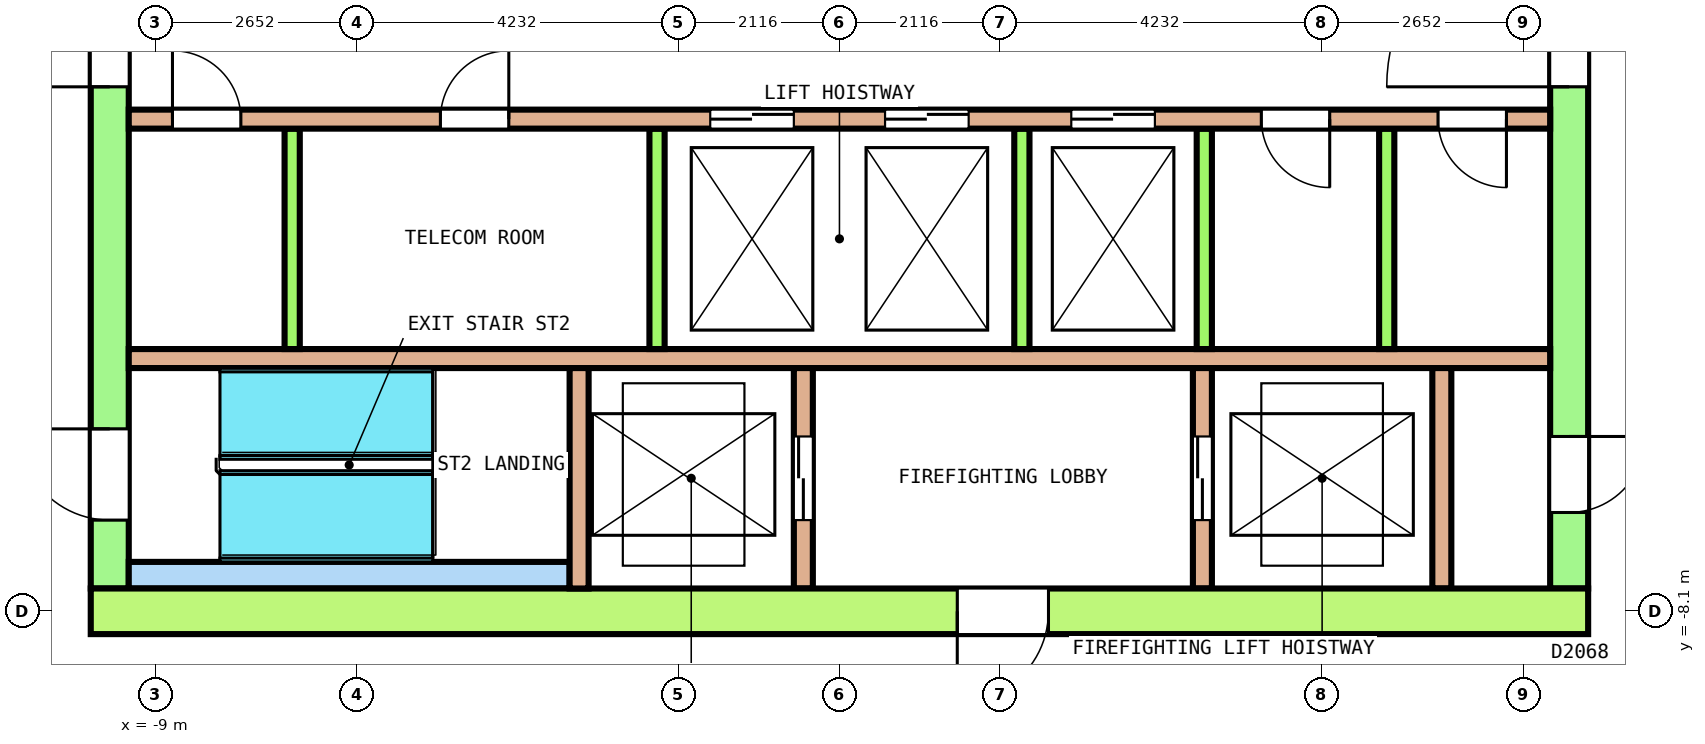
"""IFC4 building model, lengths in metres.
Left out: names, types, materials, properties, quantities, classifications, styles, units other than length and angle.
Written with IfcOpenShell. Run it as: python <this file> out.ifc"""

import sys

from ifc_helpers import new_model, si_unit, direction, frame, frame_2d, origin, place, context, subcontext, project, spatial, rectangle, extrude, element, fill, save


model = new_model("IFC4")
c1 = context("Model", 3, precision=1e-05, world=origin(), true_north=direction((0.0, 1.0)))
c2 = subcontext(c1, "Body", "Model", "MODEL_VIEW")
j1 = project(units=[si_unit("LENGTHUNIT", "METRE"), si_unit("PLANEANGLEUNIT", "RADIAN")], contexts=[c1])
p1 = place(None, origin())
s1 = spatial("IfcSite", under=j1, at=p1, CompositionType="ELEMENT")
p2 = place(p1, origin())
s2 = spatial("IfcBuilding", under=s1, at=p2, CompositionType="ELEMENT")
p3 = place(p2, frame((0.0, 0.0, 249.4)))
s3 = spatial("IfcBuildingStorey", under=s2, at=p3, CompositionType="ELEMENT", Elevation=249.4)
p4 = place(p3, frame((-9.85, -8.1, 0.0), z_axis=(0.0, 0.0, 1.0), x_axis=(1.0, 0.0, 0.0)))
e1 = element("IfcWall", 1, at=p4, inside=s3, PredefinedType="SHEAR", context=c2, shape_type="SweptSolid", body=[
    extrude(rectangle(XDim=19.7, YDim=0.6, at=frame_2d((9.85, 0.0))), origin(), (0.0, 0.0, 1.0), 3.7),
])
p5 = place(p4, frame((11.4, 0.0, 0.0)))
e2 = element("IfcOpeningElement", 2, at=p5, cuts=e1, PredefinedType="OPENING", context=c2, shape_type="SweptSolid", body=[
    extrude(rectangle(XDim=1.2, YDim=2.1, at=frame_2d((0.6, 1.05))), frame((0.0, 0.31, 0.0), z_axis=(0.0, -1.0, 0.0), x_axis=(1.0, 0.0, 0.0)), (0.0, 0.0, 1.0), 0.62),
])
p6 = place(p3, frame((-9.6, -7.8, 0.0), z_axis=(0.0, 0.0, 1.0), x_axis=(0.0, 1.0, 0.0)))
e3 = element("IfcWall", 3, at=p6, inside=s3, PredefinedType="SHEAR", context=c2, shape_type="SweptSolid", body=[
    extrude(rectangle(XDim=15.6, YDim=0.5, at=frame_2d((7.8, 0.0))), origin(), (0.0, 0.0, 1.0), 3.7),
])
p7 = place(p6, frame((6.6, 0.0, 0.0)))
e4 = element("IfcOpeningElement", 4, at=p7, cuts=e3, PredefinedType="OPENING", context=c2, shape_type="SweptSolid", body=[
    extrude(rectangle(XDim=2.4, YDim=2.1, at=frame_2d((1.2, 1.05))), frame((0.0, 0.26, 0.0), z_axis=(0.0, -1.0, 0.0), x_axis=(1.0, 0.0, 0.0)), (0.0, 0.0, 1.0), 0.52),
])
p8 = place(p6, frame((13.5, 0.0, 0.0)))
e5 = element("IfcOpeningElement", 5, at=p8, cuts=e3, PredefinedType="OPENING", context=c2, shape_type="SweptSolid", body=[
    extrude(rectangle(XDim=1.2, YDim=2.1, at=frame_2d((0.6, 1.05))), frame((0.0, 0.26, 0.0), z_axis=(0.0, -1.0, 0.0), x_axis=(1.0, 0.0, 0.0)), (0.0, 0.0, 1.0), 0.52),
])
p9 = place(p6, frame((0.9, 0.0, 0.0)))
e6 = element("IfcOpeningElement", 6, at=p9, cuts=e3, PredefinedType="OPENING", context=c2, shape_type="SweptSolid", body=[
    extrude(rectangle(XDim=1.2, YDim=2.1, at=frame_2d((0.6, 1.05))), frame((0.0, 0.26, 0.0), z_axis=(0.0, -1.0, 0.0), x_axis=(1.0, 0.0, 0.0)), (0.0, 0.0, 1.0), 0.52),
])
p10 = place(p3, frame((9.6, -7.8, 0.0), z_axis=(0.0, 0.0, 1.0), x_axis=(0.0, 1.0, 0.0)))
e7 = element("IfcWall", 7, at=p10, inside=s3, PredefinedType="SHEAR", context=c2, shape_type="SweptSolid", body=[
    extrude(rectangle(XDim=15.6, YDim=0.5, at=frame_2d((7.8, 0.0))), origin(), (0.0, 0.0, 1.0), 3.7),
])
p11 = place(p10, frame((6.6, 0.0, 0.0)))
e8 = element("IfcOpeningElement", 8, at=p11, cuts=e7, PredefinedType="OPENING", context=c2, shape_type="SweptSolid", body=[
    extrude(rectangle(XDim=2.4, YDim=2.1, at=frame_2d((1.2, 1.05))), frame((0.0, 0.26, 0.0), z_axis=(0.0, -1.0, 0.0), x_axis=(1.0, 0.0, 0.0)), (0.0, 0.0, 1.0), 0.52),
])
p12 = place(p10, frame((13.5, 0.0, 0.0)))
e9 = element("IfcOpeningElement", 9, at=p12, cuts=e7, PredefinedType="OPENING", context=c2, shape_type="SweptSolid", body=[
    extrude(rectangle(XDim=1.2, YDim=2.1, at=frame_2d((0.6, 1.05))), frame((0.0, 0.26, 0.0), z_axis=(0.0, -1.0, 0.0), x_axis=(1.0, 0.0, 0.0)), (0.0, 0.0, 1.0), 0.52),
])
p13 = place(p10, frame((1.0, 0.0, 0.0)))
e10 = element("IfcOpeningElement", 10, at=p13, cuts=e7, PredefinedType="OPENING", context=c2, shape_type="SweptSolid", body=[
    extrude(rectangle(XDim=1.0, YDim=2.1, at=frame_2d((0.5, 1.05))), frame((0.0, 0.26, 0.0), z_axis=(0.0, -1.0, 0.0), x_axis=(1.0, 0.0, 0.0)), (0.0, 0.0, 1.0), 0.52),
])
p14 = place(p3, frame((-9.35, -1.625, 0.0), z_axis=(0.0, 0.0, 1.0), x_axis=(1.0, 0.0, 0.0)))
e11 = element("IfcWall", 11, at=p14, inside=s3, PredefinedType="SOLIDWALL", context=c2, shape_type="SweptSolid", body=[
    extrude(rectangle(XDim=18.7, YDim=0.25, at=frame_2d((9.35, 0.0))), origin(), (0.0, 0.0, 1.0), 3.7),
])
p15 = place(p14, frame((7.65, 0.0, 0.0)))
e12 = element("IfcOpeningElement", 12, at=p15, cuts=e11, PredefinedType="OPENING", context=c2, shape_type="SweptSolid", body=[
    extrude(rectangle(XDim=1.1, YDim=2.1, at=frame_2d((0.55, 1.05))), frame((0.0, 0.135, 0.0), z_axis=(0.0, -1.0, 0.0), x_axis=(1.0, 0.0, 0.0)), (0.0, 0.0, 1.0), 0.27),
])
p16 = place(p14, frame((9.95, 0.0, 0.0)))
e13 = element("IfcOpeningElement", 13, at=p16, cuts=e11, PredefinedType="OPENING", context=c2, shape_type="SweptSolid", body=[
    extrude(rectangle(XDim=1.1, YDim=2.1, at=frame_2d((0.55, 1.05))), frame((0.0, 0.135, 0.0), z_axis=(0.0, -1.0, 0.0), x_axis=(1.0, 0.0, 0.0)), (0.0, 0.0, 1.0), 0.27),
])
p17 = place(p14, frame((12.4, 0.0, 0.0)))
e14 = element("IfcOpeningElement", 14, at=p17, cuts=e11, PredefinedType="OPENING", context=c2, shape_type="SweptSolid", body=[
    extrude(rectangle(XDim=1.1, YDim=2.1, at=frame_2d((0.55, 1.05))), frame((0.0, 0.135, 0.0), z_axis=(0.0, -1.0, 0.0), x_axis=(1.0, 0.0, 0.0)), (0.0, 0.0, 1.0), 0.27),
])
p18 = place(p14, frame((0.575, 0.0, 0.0)))
e15 = element("IfcOpeningElement", 15, at=p18, cuts=e11, PredefinedType="OPENING", context=c2, shape_type="SweptSolid", body=[
    extrude(rectangle(XDim=0.9, YDim=2.1, at=frame_2d((0.45, 1.05))), frame((0.0, 0.135, 0.0), z_axis=(0.0, -1.0, 0.0), x_axis=(1.0, 0.0, 0.0)), (0.0, 0.0, 1.0), 0.27),
])
p19 = place(p14, frame((4.1, 0.0, 0.0)))
e16 = element("IfcOpeningElement", 16, at=p19, cuts=e11, PredefinedType="OPENING", context=c2, shape_type="SweptSolid", body=[
    extrude(rectangle(XDim=0.9, YDim=2.1, at=frame_2d((0.45, 1.05))), frame((0.0, 0.135, 0.0), z_axis=(0.0, -1.0, 0.0), x_axis=(1.0, 0.0, 0.0)), (0.0, 0.0, 1.0), 0.27),
])
p20 = place(p14, frame((14.9, 0.0, 0.0)))
e17 = element("IfcOpeningElement", 17, at=p20, cuts=e11, PredefinedType="OPENING", context=c2, shape_type="SweptSolid", body=[
    extrude(rectangle(XDim=0.9, YDim=2.1, at=frame_2d((0.45, 1.05))), frame((0.0, 0.135, 0.0), z_axis=(0.0, -1.0, 0.0), x_axis=(1.0, 0.0, 0.0)), (0.0, 0.0, 1.0), 0.27),
])
p21 = place(p14, frame((17.225, 0.0, 0.0)))
e18 = element("IfcOpeningElement", 18, at=p21, cuts=e11, PredefinedType="OPENING", context=c2, shape_type="SweptSolid", body=[
    extrude(rectangle(XDim=0.9, YDim=2.1, at=frame_2d((0.45, 1.05))), frame((0.0, 0.135, 0.0), z_axis=(0.0, -1.0, 0.0), x_axis=(1.0, 0.0, 0.0)), (0.0, 0.0, 1.0), 0.27),
])
p22 = place(p3, frame((-9.35, -4.775, 0.0), z_axis=(0.0, 0.0, 1.0), x_axis=(1.0, 0.0, 0.0)))
e19 = element("IfcWall", 19, at=p22, inside=s3, PredefinedType="SOLIDWALL", context=c2, shape_type="SweptSolid", body=[
    extrude(rectangle(XDim=18.7, YDim=0.25, at=frame_2d((9.35, 0.0))), origin(), (0.0, 0.0, 1.0), 3.7),
])
for number, where, z_axis, x_axis in (
    (20, (-7.2, -4.65, 0.0), (0.0, 0.0, 1.0), (0.0, 1.0, 0.0)),
    (21, (-2.4, -4.65, 0.0), (0.0, 0.0, 1.0), (0.0, 1.0, 0.0)),
    (22, (2.4, -4.65, 0.0), (0.0, 0.0, 1.0), (0.0, 1.0, 0.0)),
    (23, (4.8, -4.65, 0.0), (0.0, 0.0, 1.0), (0.0, 1.0, 0.0)),
    (24, (7.2, -4.65, 0.0), (0.0, 0.0, 1.0), (0.0, 1.0, 0.0)),
):
    element("IfcWall", number, at=place(p3, frame(where, z_axis=z_axis, x_axis=x_axis)), inside=s3, PredefinedType="SOLIDWALL", context=c2, shape_type="SweptSolid", body=[
        extrude(rectangle(XDim=2.9, YDim=0.2, at=frame_2d((1.45, 0.0))), origin(), (0.0, 0.0, 1.0), 3.7),
    ])
p23 = place(p3, frame((-9.35, -7.625, 0.0), z_axis=(0.0, 0.0, 1.0), x_axis=(1.0, 0.0, 0.0)))
e25 = element("IfcWall", 25, at=p23, inside=s3, PredefinedType="SOLIDWALL", context=c2, shape_type="SweptSolid", body=[
    extrude(rectangle(XDim=5.8, YDim=0.35, at=frame_2d((2.9, 0.0))), origin(), (0.0, 0.0, 1.0), 3.7),
])
p24 = place(p3, frame((-3.425, -7.8, 0.0), z_axis=(0.0, 0.0, 1.0), x_axis=(0.0, 1.0, 0.0)))
e26 = element("IfcWall", 26, at=p24, inside=s3, PredefinedType="SOLIDWALL", context=c2, shape_type="SweptSolid", body=[
    extrude(rectangle(XDim=2.9, YDim=0.25, at=frame_2d((1.45, 0.0))), origin(), (0.0, 0.0, 1.0), 3.7),
])
p25 = place(p3, frame((-0.475, -7.8, 0.0), z_axis=(0.0, 0.0, 1.0), x_axis=(0.0, 1.0, 0.0)))
e27 = element("IfcWall", 27, at=p25, inside=s3, PredefinedType="SOLIDWALL", context=c2, shape_type="SweptSolid", body=[
    extrude(rectangle(XDim=2.9, YDim=0.25, at=frame_2d((1.45, 0.0))), origin(), (0.0, 0.0, 1.0), 3.7),
])
p26 = place(p25, frame((0.9, 0.0, 0.0)))
e28 = element("IfcOpeningElement", 28, at=p26, cuts=e27, PredefinedType="OPENING", context=c2, shape_type="SweptSolid", body=[
    extrude(rectangle(XDim=1.1, YDim=2.1, at=frame_2d((0.55, 1.05))), frame((0.0, 0.135, 0.0), z_axis=(0.0, -1.0, 0.0), x_axis=(1.0, 0.0, 0.0)), (0.0, 0.0, 1.0), 0.27),
])
p27 = place(p3, frame((4.775, -7.8, 0.0), z_axis=(0.0, 0.0, 1.0), x_axis=(0.0, 1.0, 0.0)))
e29 = element("IfcWall", 29, at=p27, inside=s3, PredefinedType="SOLIDWALL", context=c2, shape_type="SweptSolid", body=[
    extrude(rectangle(XDim=2.9, YDim=0.25, at=frame_2d((1.45, 0.0))), origin(), (0.0, 0.0, 1.0), 3.7),
])
p28 = place(p27, frame((0.9, 0.0, 0.0)))
e30 = element("IfcOpeningElement", 30, at=p28, cuts=e29, PredefinedType="OPENING", context=c2, shape_type="SweptSolid", body=[
    extrude(rectangle(XDim=1.1, YDim=2.1, at=frame_2d((0.55, 1.05))), frame((0.0, 0.135, 0.0), z_axis=(0.0, -1.0, 0.0), x_axis=(1.0, 0.0, 0.0)), (0.0, 0.0, 1.0), 0.27),
])
p29 = place(p3, frame((7.925, -7.8, 0.0), z_axis=(0.0, 0.0, 1.0), x_axis=(0.0, 1.0, 0.0)))
e31 = element("IfcWall", 31, at=p29, inside=s3, PredefinedType="SOLIDWALL", context=c2, shape_type="SweptSolid", body=[
    extrude(rectangle(XDim=2.9, YDim=0.25, at=frame_2d((1.45, 0.0))), origin(), (0.0, 0.0, 1.0), 3.7),
])
p30 = place(p15, origin())
e32 = element("IfcDoor", 32, at=p30, inside=s3, OperationType="DOUBLE_DOOR_SLIDING", PredefinedType="DOOR", context=c2, shape_type="SweptSolid", body=[
    extrude(rectangle(XDim=1.1, YDim=2.1, at=frame_2d((0.55, 1.05))), frame((0.0, 0.075, 0.0), z_axis=(0.0, -1.0, 0.0), x_axis=(1.0, 0.0, 0.0)), (0.0, 0.0, 1.0), 0.15),
])
fill(e12, e32)
p31 = place(p16, origin())
e33 = element("IfcDoor", 33, at=p31, inside=s3, OperationType="DOUBLE_DOOR_SLIDING", PredefinedType="DOOR", context=c2, shape_type="SweptSolid", body=[
    extrude(rectangle(XDim=1.1, YDim=2.1, at=frame_2d((0.55, 1.05))), frame((0.0, 0.075, 0.0), z_axis=(0.0, -1.0, 0.0), x_axis=(1.0, 0.0, 0.0)), (0.0, 0.0, 1.0), 0.15),
])
fill(e13, e33)
p32 = place(p17, origin())
e34 = element("IfcDoor", 34, at=p32, inside=s3, OperationType="DOUBLE_DOOR_SLIDING", PredefinedType="DOOR", context=c2, shape_type="SweptSolid", body=[
    extrude(rectangle(XDim=1.1, YDim=2.1, at=frame_2d((0.55, 1.05))), frame((0.0, 0.075, 0.0), z_axis=(0.0, -1.0, 0.0), x_axis=(1.0, 0.0, 0.0)), (0.0, 0.0, 1.0), 0.15),
])
fill(e14, e34)
p33 = place(p26, origin())
e35 = element("IfcDoor", 35, at=p33, inside=s3, OperationType="DOUBLE_DOOR_SLIDING", PredefinedType="DOOR", context=c2, shape_type="SweptSolid", body=[
    extrude(rectangle(XDim=1.1, YDim=2.1, at=frame_2d((0.55, 1.05))), frame((0.0, 0.075, 0.0), z_axis=(0.0, -1.0, 0.0), x_axis=(1.0, 0.0, 0.0)), (0.0, 0.0, 1.0), 0.15),
])
fill(e28, e35)
p34 = place(p28, origin())
e36 = element("IfcDoor", 36, at=p34, inside=s3, OperationType="DOUBLE_DOOR_SLIDING", PredefinedType="DOOR", context=c2, shape_type="SweptSolid", body=[
    extrude(rectangle(XDim=1.1, YDim=2.1, at=frame_2d((0.55, 1.05))), frame((0.0, 0.075, 0.0), z_axis=(0.0, -1.0, 0.0), x_axis=(1.0, 0.0, 0.0)), (0.0, 0.0, 1.0), 0.15),
])
fill(e30, e36)
p35 = place(p7, origin())
e37 = element("IfcDoor", 37, at=p35, inside=s3, OperationType="DOUBLE_DOOR_SINGLE_SWING", PredefinedType="DOOR", context=c2, shape_type="SweptSolid", body=[
    extrude(rectangle(XDim=2.4, YDim=2.1, at=frame_2d((1.2, 1.05))), frame((0.0, 0.2, 0.0), z_axis=(0.0, -1.0, 0.0), x_axis=(1.0, 0.0, 0.0)), (0.0, 0.0, 1.0), 0.4),
])
fill(e4, e37)
p36 = place(p11, origin())
e38 = element("IfcDoor", 38, at=p36, inside=s3, OperationType="DOUBLE_DOOR_SINGLE_SWING", PredefinedType="DOOR", context=c2, shape_type="SweptSolid", body=[
    extrude(rectangle(XDim=2.4, YDim=2.1, at=frame_2d((1.2, 1.05))), frame((0.0, 0.2, 0.0), z_axis=(0.0, -1.0, 0.0), x_axis=(1.0, 0.0, 0.0)), (0.0, 0.0, 1.0), 0.4),
])
fill(e8, e38)
p37 = place(p9, origin())
e39 = element("IfcDoor", 39, at=p37, inside=s3, OperationType="SINGLE_SWING_LEFT", PredefinedType="DOOR", context=c2, shape_type="SweptSolid", body=[
    extrude(rectangle(XDim=1.2, YDim=2.1, at=frame_2d((0.6, 1.05))), frame((0.0, 0.2, 0.0), z_axis=(0.0, -1.0, 0.0), x_axis=(1.0, 0.0, 0.0)), (0.0, 0.0, 1.0), 0.4),
])
fill(e6, e39)
p38 = place(p5, origin())
e40 = element("IfcDoor", 40, at=p38, inside=s3, OperationType="SINGLE_SWING_LEFT", PredefinedType="DOOR", context=c2, shape_type="SweptSolid", body=[
    extrude(rectangle(XDim=1.2, YDim=2.1, at=frame_2d((0.6, 1.05))), frame((0.0, 0.25, 0.0), z_axis=(0.0, -1.0, 0.0), x_axis=(1.0, 0.0, 0.0)), (0.0, 0.0, 1.0), 0.5),
])
fill(e2, e40)
p39 = place(p13, origin())
e41 = element("IfcDoor", 41, at=p39, inside=s3, OperationType="SINGLE_SWING_LEFT", PredefinedType="DOOR", context=c2, shape_type="SweptSolid", body=[
    extrude(rectangle(XDim=1.0, YDim=2.1, at=frame_2d((0.5, 1.05))), frame((0.0, 0.2, 0.0), z_axis=(0.0, -1.0, 0.0), x_axis=(1.0, 0.0, 0.0)), (0.0, 0.0, 1.0), 0.4),
])
fill(e10, e41)
p40 = place(p18, origin())
e42 = element("IfcDoor", 42, at=p40, inside=s3, OperationType="SINGLE_SWING_RIGHT", PredefinedType="DOOR", context=c2, shape_type="SweptSolid", body=[
    extrude(rectangle(XDim=0.9, YDim=2.1, at=frame_2d((0.45, 1.05))), frame((0.0, 0.075, 0.0), z_axis=(0.0, -1.0, 0.0), x_axis=(1.0, 0.0, 0.0)), (0.0, 0.0, 1.0), 0.15),
])
fill(e15, e42)
p41 = place(p19, origin())
e43 = element("IfcDoor", 43, at=p41, inside=s3, OperationType="SINGLE_SWING_LEFT", PredefinedType="DOOR", context=c2, shape_type="SweptSolid", body=[
    extrude(rectangle(XDim=0.9, YDim=2.1, at=frame_2d((0.45, 1.05))), frame((0.0, 0.075, 0.0), z_axis=(0.0, -1.0, 0.0), x_axis=(1.0, 0.0, 0.0)), (0.0, 0.0, 1.0), 0.15),
])
fill(e16, e43)
p42 = place(p20, origin())
e44 = element("IfcDoor", 44, at=p42, inside=s3, OperationType="SINGLE_SWING_RIGHT", PredefinedType="DOOR", context=c2, shape_type="SweptSolid", body=[
    extrude(rectangle(XDim=0.9, YDim=2.1, at=frame_2d((0.45, 1.05))), frame((0.0, 0.075, 0.0), z_axis=(0.0, -1.0, 0.0), x_axis=(1.0, 0.0, 0.0)), (0.0, 0.0, 1.0), 0.15),
])
fill(e17, e44)
p43 = place(p21, origin())
e45 = element("IfcDoor", 45, at=p43, inside=s3, OperationType="SINGLE_SWING_LEFT", PredefinedType="DOOR", context=c2, shape_type="SweptSolid", body=[
    extrude(rectangle(XDim=0.9, YDim=2.1, at=frame_2d((0.45, 1.05))), frame((0.0, 0.075, 0.0), z_axis=(0.0, -1.0, 0.0), x_axis=(1.0, 0.0, 0.0)), (0.0, 0.0, 1.0), 0.15),
])
fill(e18, e45)
save(model, sys.argv[1])
